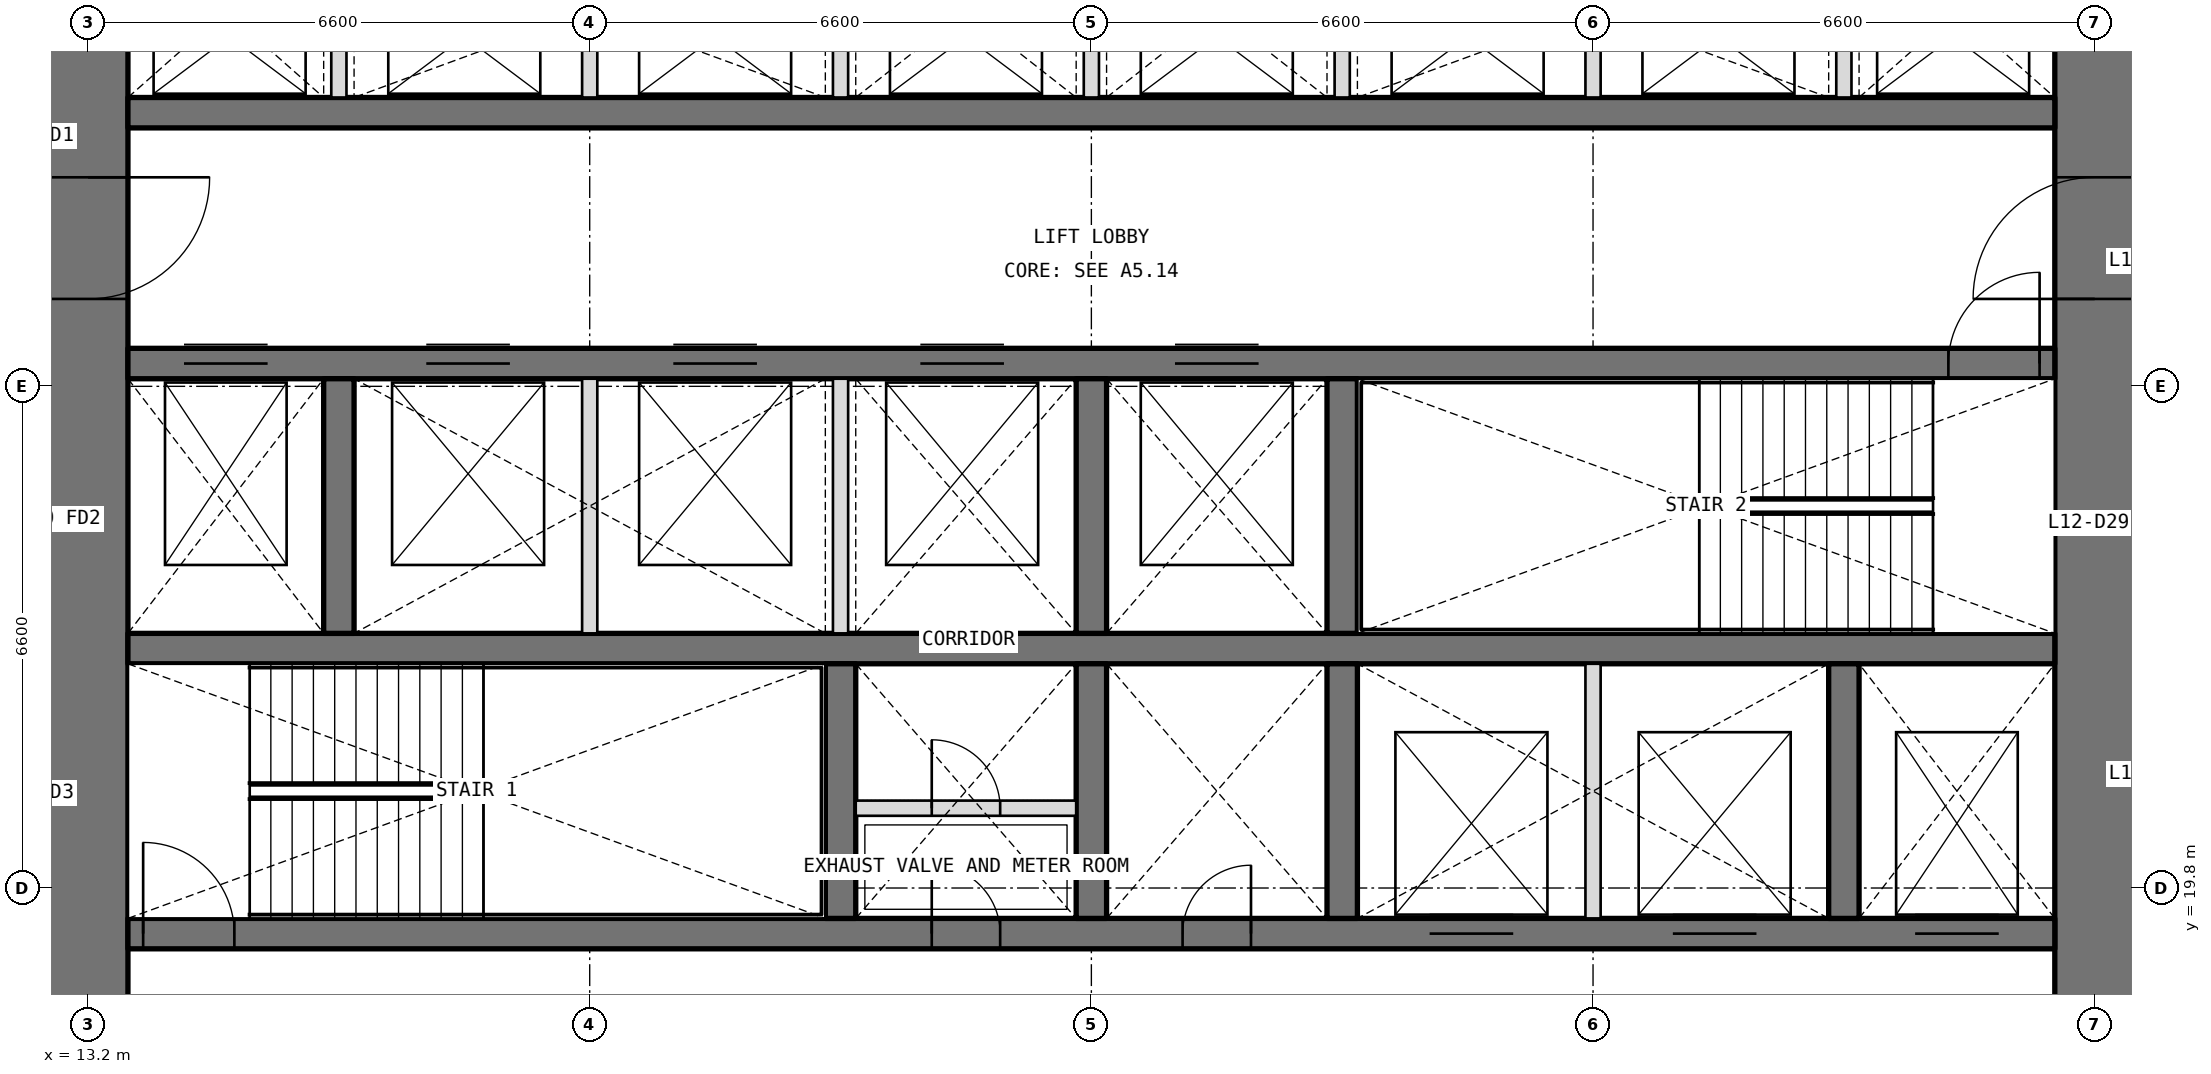
"""IFC4 building model, lengths in metres.
Left out: names, types, materials, properties, quantities, classifications, styles, units other than length and angle.
Written with IfcOpenShell. Run it as: python <this file> out.ifc"""

import sys

from ifc_helpers import new_model, si_unit, direction, frame, frame_2d, origin, place, context, subcontext, project, spatial, rectangle, extrude, element, fill, save


model = new_model("IFC4")
c1 = context("Model", 3, precision=1e-05, world=origin(), true_north=direction((0.0, 1.0)))
c2 = subcontext(c1, "Body", "Model", "MODEL_VIEW")
j1 = project(units=[si_unit("LENGTHUNIT", "METRE"), si_unit("PLANEANGLEUNIT", "RADIAN")], contexts=[c1])
p1 = place(None, origin())
s1 = spatial("IfcSite", under=j1, at=p1, CompositionType="ELEMENT")
p2 = place(p1, origin())
s2 = spatial("IfcBuilding", under=s1, at=p2, CompositionType="ELEMENT")
p3 = place(p2, frame((0.0, 0.0, 54.9)))
s3 = spatial("IfcBuildingStorey", under=s2, at=p3, CompositionType="ELEMENT", Elevation=54.9)
p4 = place(p3, frame((39.6, 13.725, 0.0), z_axis=(0.0, 0.0, 1.0), x_axis=(0.0, 1.0, 0.0)))
e1 = element("IfcWall", 1, at=p4, inside=s3, PredefinedType="SHEAR", context=c2, shape_type="SweptSolid", body=[
    extrude(rectangle(XDim=18.75, YDim=1.05, at=frame_2d((9.375, 0.0))), origin(), (0.0, 0.0, 1.0), 4.2),
])
p5 = place(p4, frame((3.025, 0.0, 0.0)))
e2 = element("IfcOpeningElement", 2, at=p5, cuts=e1, PredefinedType="OPENING", context=c2, shape_type="SweptSolid", body=[
    extrude(rectangle(XDim=1.6, YDim=2.1, at=frame_2d((0.8, 1.05))), frame((0.0, 0.535, 0.0), z_axis=(0.0, -1.0, 0.0), x_axis=(1.0, 0.0, 0.0)), (0.0, 0.0, 1.0), 1.07),
])
p6 = place(p4, frame((13.825, 0.0, 0.0)))
e3 = element("IfcOpeningElement", 3, at=p6, cuts=e1, PredefinedType="OPENING", context=c2, shape_type="SweptSolid", body=[
    extrude(rectangle(XDim=1.6, YDim=2.1, at=frame_2d((0.8, 1.05))), frame((0.0, 0.535, 0.0), z_axis=(0.0, -1.0, 0.0), x_axis=(1.0, 0.0, 0.0)), (0.0, 0.0, 1.0), 1.07),
])
p7 = place(p3, frame((13.2, 32.475, 0.0), z_axis=(0.0, 0.0, 1.0), x_axis=(0.0, -1.0, 0.0)))
e4 = element("IfcWall", 4, at=p7, inside=s3, PredefinedType="SHEAR", context=c2, shape_type="SweptSolid", body=[
    extrude(rectangle(XDim=18.75, YDim=1.05, at=frame_2d((9.375, 0.0))), origin(), (0.0, 0.0, 1.0), 4.2),
])
p8 = place(p7, frame((14.125, 0.0, 0.0)))
e5 = element("IfcOpeningElement", 5, at=p8, cuts=e4, PredefinedType="OPENING", context=c2, shape_type="SweptSolid", body=[
    extrude(rectangle(XDim=1.6, YDim=2.1, at=frame_2d((0.8, 1.05))), frame((0.0, 0.535, 0.0), z_axis=(0.0, -1.0, 0.0), x_axis=(1.0, 0.0, 0.0)), (0.0, 0.0, 1.0), 1.07),
])
p9 = place(p7, frame((3.325, 0.0, 0.0)))
e6 = element("IfcOpeningElement", 6, at=p9, cuts=e4, PredefinedType="OPENING", context=c2, shape_type="SweptSolid", body=[
    extrude(rectangle(XDim=1.6, YDim=2.1, at=frame_2d((0.8, 1.05))), frame((0.0, 0.535, 0.0), z_axis=(0.0, -1.0, 0.0), x_axis=(1.0, 0.0, 0.0)), (0.0, 0.0, 1.0), 1.07),
])
p10 = place(p3, frame((13.725, 19.2, 0.0), z_axis=(0.0, 0.0, 1.0), x_axis=(1.0, 0.0, 0.0)))
e7 = element("IfcWall", 7, at=p10, inside=s3, PredefinedType="SHEAR", context=c2, shape_type="SweptSolid", body=[
    extrude(rectangle(XDim=25.35, YDim=0.4, at=frame_2d((12.675, 0.0))), origin(), (0.0, 0.0, 1.0), 4.2),
])
p11 = place(p10, frame((10.575, 0.0, 0.0)))
e8 = element("IfcOpeningElement", 8, at=p11, cuts=e7, PredefinedType="OPENING", context=c2, shape_type="SweptSolid", body=[
    extrude(rectangle(XDim=0.9, YDim=2.1, at=frame_2d((0.45, 1.05))), frame((0.0, 0.21, 0.0), z_axis=(0.0, -1.0, 0.0), x_axis=(1.0, 0.0, 0.0)), (0.0, 0.0, 1.0), 0.42),
])
p12 = place(p10, frame((13.875, 0.0, 0.0)))
e9 = element("IfcOpeningElement", 9, at=p12, cuts=e7, PredefinedType="OPENING", context=c2, shape_type="SweptSolid", body=[
    extrude(rectangle(XDim=0.9, YDim=2.1, at=frame_2d((0.45, 1.05))), frame((0.0, 0.21, 0.0), z_axis=(0.0, -1.0, 0.0), x_axis=(1.0, 0.0, 0.0)), (0.0, 0.0, 1.0), 0.42),
])
p13 = place(p10, frame((0.2, 0.0, 0.0)))
e10 = element("IfcOpeningElement", 10, at=p13, cuts=e7, PredefinedType="OPENING", context=c2, shape_type="SweptSolid", body=[
    extrude(rectangle(XDim=1.2, YDim=2.1, at=frame_2d((0.6, 1.05))), frame((0.0, 0.21, 0.0), z_axis=(0.0, -1.0, 0.0), x_axis=(1.0, 0.0, 0.0)), (0.0, 0.0, 1.0), 0.42),
])
p14 = place(p10, frame((23.512, 0.0, 0.0)))
e11 = element("IfcOpeningElement", 11, at=p14, cuts=e7, PredefinedType="OPENING", context=c2, shape_type="SweptSolid", body=[
    extrude(rectangle(XDim=1.1, YDim=2.1, at=frame_2d((0.55, 1.05))), frame((0.0, 0.21, 0.0), z_axis=(0.0, -1.0, 0.0), x_axis=(1.0, 0.0, 0.0)), (0.0, 0.0, 1.0), 0.42),
])
p15 = place(p10, frame((17.125, 0.0, 0.0)))
e12 = element("IfcOpeningElement", 12, at=p15, cuts=e7, PredefinedType="OPENING", context=c2, shape_type="SweptSolid", body=[
    extrude(rectangle(XDim=1.1, YDim=2.1, at=frame_2d((0.55, 1.05))), frame((0.0, 0.21, 0.0), z_axis=(0.0, -1.0, 0.0), x_axis=(1.0, 0.0, 0.0)), (0.0, 0.0, 1.0), 0.42),
])
p16 = place(p10, frame((20.325, 0.0, 0.0)))
e13 = element("IfcOpeningElement", 13, at=p16, cuts=e7, PredefinedType="OPENING", context=c2, shape_type="SweptSolid", body=[
    extrude(rectangle(XDim=1.1, YDim=2.1, at=frame_2d((0.55, 1.05))), frame((0.0, 0.21, 0.0), z_axis=(0.0, -1.0, 0.0), x_axis=(1.0, 0.0, 0.0)), (0.0, 0.0, 1.0), 0.42),
])
p17 = place(p3, frame((13.725, 22.95, 0.0), z_axis=(0.0, 0.0, 1.0), x_axis=(1.0, 0.0, 0.0)))
e14 = element("IfcWall", 14, at=p17, inside=s3, PredefinedType="SHEAR", context=c2, shape_type="SweptSolid", body=[
    extrude(rectangle(XDim=25.35, YDim=0.4, at=frame_2d((12.675, 0.0))), origin(), (0.0, 0.0, 1.0), 4.2),
])
p18 = place(p3, frame((13.725, 26.7, 0.0), z_axis=(0.0, 0.0, 1.0), x_axis=(1.0, 0.0, 0.0)))
e15 = element("IfcWall", 15, at=p18, inside=s3, PredefinedType="SHEAR", context=c2, shape_type="SweptSolid", body=[
    extrude(rectangle(XDim=25.35, YDim=0.4, at=frame_2d((12.675, 0.0))), origin(), (0.0, 0.0, 1.0), 4.2),
])
p19 = place(p18, frame((23.95, 0.0, 0.0)))
e16 = element("IfcOpeningElement", 16, at=p19, cuts=e15, PredefinedType="OPENING", context=c2, shape_type="SweptSolid", body=[
    extrude(rectangle(XDim=1.2, YDim=2.1, at=frame_2d((0.6, 1.05))), frame((0.0, 0.21, 0.0), z_axis=(0.0, -1.0, 0.0), x_axis=(1.0, 0.0, 0.0)), (0.0, 0.0, 1.0), 0.42),
])
p20 = place(p18, frame((0.738, 0.0, 0.0)))
e17 = element("IfcOpeningElement", 17, at=p20, cuts=e15, PredefinedType="OPENING", context=c2, shape_type="SweptSolid", body=[
    extrude(rectangle(XDim=1.1, YDim=2.1, at=frame_2d((0.55, 1.05))), frame((0.0, 0.21, 0.0), z_axis=(0.0, -1.0, 0.0), x_axis=(1.0, 0.0, 0.0)), (0.0, 0.0, 1.0), 0.42),
])
p21 = place(p18, frame((3.925, 0.0, 0.0)))
e18 = element("IfcOpeningElement", 18, at=p21, cuts=e15, PredefinedType="OPENING", context=c2, shape_type="SweptSolid", body=[
    extrude(rectangle(XDim=1.1, YDim=2.1, at=frame_2d((0.55, 1.05))), frame((0.0, 0.21, 0.0), z_axis=(0.0, -1.0, 0.0), x_axis=(1.0, 0.0, 0.0)), (0.0, 0.0, 1.0), 0.42),
])
p22 = place(p18, frame((7.175, 0.0, 0.0)))
e19 = element("IfcOpeningElement", 19, at=p22, cuts=e15, PredefinedType="OPENING", context=c2, shape_type="SweptSolid", body=[
    extrude(rectangle(XDim=1.1, YDim=2.1, at=frame_2d((0.55, 1.05))), frame((0.0, 0.21, 0.0), z_axis=(0.0, -1.0, 0.0), x_axis=(1.0, 0.0, 0.0)), (0.0, 0.0, 1.0), 0.42),
])
p23 = place(p18, frame((10.425, 0.0, 0.0)))
e20 = element("IfcOpeningElement", 20, at=p23, cuts=e15, PredefinedType="OPENING", context=c2, shape_type="SweptSolid", body=[
    extrude(rectangle(XDim=1.1, YDim=2.1, at=frame_2d((0.55, 1.05))), frame((0.0, 0.21, 0.0), z_axis=(0.0, -1.0, 0.0), x_axis=(1.0, 0.0, 0.0)), (0.0, 0.0, 1.0), 0.42),
])
p24 = place(p18, frame((13.775, 0.0, 0.0)))
e21 = element("IfcOpeningElement", 21, at=p24, cuts=e15, PredefinedType="OPENING", context=c2, shape_type="SweptSolid", body=[
    extrude(rectangle(XDim=1.1, YDim=2.1, at=frame_2d((0.55, 1.05))), frame((0.0, 0.21, 0.0), z_axis=(0.0, -1.0, 0.0), x_axis=(1.0, 0.0, 0.0)), (0.0, 0.0, 1.0), 0.42),
])
p25 = place(p3, frame((13.725, 30.0, 0.0), z_axis=(0.0, 0.0, 1.0), x_axis=(1.0, 0.0, 0.0)))
e22 = element("IfcWall", 22, at=p25, inside=s3, PredefinedType="SHEAR", context=c2, shape_type="SweptSolid", body=[
    extrude(rectangle(XDim=25.35, YDim=0.4, at=frame_2d((12.675, 0.0))), origin(), (0.0, 0.0, 1.0), 4.2),
])
for number, where, z_axis, x_axis in (
    (23, (23.1, 19.4, 0.0), (0.0, 0.0, 1.0), (0.0, 1.0, 0.0)),
    (24, (26.4, 19.4, 0.0), (0.0, 0.0, 1.0), (0.0, 1.0, 0.0)),
    (25, (29.7, 19.4, 0.0), (0.0, 0.0, 1.0), (0.0, 1.0, 0.0)),
    (26, (36.3, 19.4, 0.0), (0.0, 0.0, 1.0), (0.0, 1.0, 0.0)),
    (27, (16.5, 23.15, 0.0), (0.0, 0.0, 1.0), (0.0, 1.0, 0.0)),
    (28, (26.4, 23.15, 0.0), (0.0, 0.0, 1.0), (0.0, 1.0, 0.0)),
    (29, (29.7, 23.15, 0.0), (0.0, 0.0, 1.0), (0.0, 1.0, 0.0)),
):
    element("IfcWall", number, at=place(p3, frame(where, z_axis=z_axis, x_axis=x_axis)), inside=s3, PredefinedType="SHEAR", context=c2, shape_type="SweptSolid", body=[
        extrude(rectangle(XDim=3.35, YDim=0.4, at=frame_2d((1.675, 0.0))), origin(), (0.0, 0.0, 1.0), 4.2),
    ])
for number, where, z_axis, x_axis in (
    (30, (16.5, 30.2, 0.0), (0.0, 0.0, 1.0), (0.0, 1.0, 0.0)),
    (31, (19.8, 30.2, 0.0), (0.0, 0.0, 1.0), (0.0, 1.0, 0.0)),
    (32, (23.1, 30.2, 0.0), (0.0, 0.0, 1.0), (0.0, 1.0, 0.0)),
    (33, (26.4, 30.2, 0.0), (0.0, 0.0, 1.0), (0.0, 1.0, 0.0)),
    (34, (29.7, 30.2, 0.0), (0.0, 0.0, 1.0), (0.0, 1.0, 0.0)),
    (35, (33.0, 30.2, 0.0), (0.0, 0.0, 1.0), (0.0, 1.0, 0.0)),
    (36, (36.3, 30.2, 0.0), (0.0, 0.0, 1.0), (0.0, 1.0, 0.0)),
):
    element("IfcWall", number, at=place(p3, frame(where, z_axis=z_axis, x_axis=x_axis)), inside=s3, PredefinedType="PARTITIONING", context=c2, shape_type="SweptSolid", body=[
        extrude(rectangle(XDim=2.275, YDim=0.2, at=frame_2d((1.138, 0.0))), origin(), (0.0, 0.0, 1.0), 4.2),
    ])
for number, where, z_axis, x_axis in (
    (37, (33.0, 19.4, 0.0), (0.0, 0.0, 1.0), (0.0, 1.0, 0.0)),
    (38, (19.8, 23.15, 0.0), (0.0, 0.0, 1.0), (0.0, 1.0, 0.0)),
    (39, (23.1, 23.15, 0.0), (0.0, 0.0, 1.0), (0.0, 1.0, 0.0)),
):
    element("IfcWall", number, at=place(p3, frame(where, z_axis=z_axis, x_axis=x_axis)), inside=s3, PredefinedType="PARTITIONING", context=c2, shape_type="SweptSolid", body=[
        extrude(rectangle(XDim=3.35, YDim=0.2, at=frame_2d((1.675, 0.0))), origin(), (0.0, 0.0, 1.0), 4.2),
    ])
p26 = place(p3, frame((23.3, 20.85, 0.0), z_axis=(0.0, 0.0, 1.0), x_axis=(1.0, 0.0, 0.0)))
e40 = element("IfcWall", 40, at=p26, inside=s3, PredefinedType="PARTITIONING", context=c2, shape_type="SweptSolid", body=[
    extrude(rectangle(XDim=2.9, YDim=0.2, at=frame_2d((1.45, 0.0))), origin(), (0.0, 0.0, 1.0), 3.9),
])
p27 = place(p26, frame((1.0, 0.0, 0.0)))
e41 = element("IfcOpeningElement", 41, at=p27, cuts=e40, PredefinedType="OPENING", context=c2, shape_type="SweptSolid", body=[
    extrude(rectangle(XDim=0.9, YDim=2.1, at=frame_2d((0.45, 1.05))), frame((0.0, 0.11, 0.0), z_axis=(0.0, -1.0, 0.0), x_axis=(1.0, 0.0, 0.0)), (0.0, 0.0, 1.0), 0.22),
])
p28 = place(p11, origin())
e42 = element("IfcDoor", 42, at=p28, inside=s3, OperationType="SINGLE_SWING_LEFT", PredefinedType="DOOR", context=c2, shape_type="SweptSolid", body=[
    extrude(rectangle(XDim=0.9, YDim=2.1, at=frame_2d((0.45, 1.05))), frame((0.0, 0.025, 0.0), z_axis=(0.0, -1.0, 0.0), x_axis=(1.0, 0.0, 0.0)), (0.0, 0.0, 1.0), 0.05),
])
fill(e8, e42)
p29 = place(p27, origin())
e43 = element("IfcDoor", 43, at=p29, inside=s3, OperationType="SINGLE_SWING_LEFT", PredefinedType="DOOR", context=c2, shape_type="SweptSolid", body=[
    extrude(rectangle(XDim=0.9, YDim=2.1, at=frame_2d((0.45, 1.05))), frame((0.0, 0.025, 0.0), z_axis=(0.0, -1.0, 0.0), x_axis=(1.0, 0.0, 0.0)), (0.0, 0.0, 1.0), 0.05),
])
fill(e41, e43)
p30 = place(p12, origin())
e44 = element("IfcDoor", 44, at=p30, inside=s3, OperationType="SINGLE_SWING_RIGHT", PredefinedType="DOOR", context=c2, shape_type="SweptSolid", body=[
    extrude(rectangle(XDim=0.9, YDim=2.1, at=frame_2d((0.45, 1.05))), frame((0.0, 0.025, 0.0), z_axis=(0.0, -1.0, 0.0), x_axis=(1.0, 0.0, 0.0)), (0.0, 0.0, 1.0), 0.05),
])
fill(e9, e44)
p31 = place(p13, origin())
e45 = element("IfcDoor", 45, at=p31, inside=s3, OperationType="SINGLE_SWING_LEFT", PredefinedType="DOOR", context=c2, shape_type="SweptSolid", body=[
    extrude(rectangle(XDim=1.2, YDim=2.1, at=frame_2d((0.6, 1.05))), frame((0.0, 0.025, 0.0), z_axis=(0.0, -1.0, 0.0), x_axis=(1.0, 0.0, 0.0)), (0.0, 0.0, 1.0), 0.05),
])
fill(e10, e45)
p32 = place(p19, origin())
e46 = element("IfcDoor", 46, at=p32, inside=s3, OperationType="SINGLE_SWING_RIGHT", PredefinedType="DOOR", context=c2, shape_type="SweptSolid", body=[
    extrude(rectangle(XDim=1.2, YDim=2.1, at=frame_2d((0.6, 1.05))), frame((0.0, 0.025, 0.0), z_axis=(0.0, -1.0, 0.0), x_axis=(1.0, 0.0, 0.0)), (0.0, 0.0, 1.0), 0.05),
])
fill(e16, e46)
p33 = place(p9, origin())
e47 = element("IfcDoor", 47, at=p33, inside=s3, OperationType="DOUBLE_DOOR_DOUBLE_SWING", PredefinedType="DOOR", context=c2, shape_type="SweptSolid", body=[
    extrude(rectangle(XDim=1.6, YDim=2.1, at=frame_2d((0.8, 1.05))), frame((0.0, 0.025, 0.0), z_axis=(0.0, -1.0, 0.0), x_axis=(1.0, 0.0, 0.0)), (0.0, 0.0, 1.0), 0.05),
])
fill(e6, e47)
p34 = place(p6, origin())
e48 = element("IfcDoor", 48, at=p34, inside=s3, OperationType="DOUBLE_DOOR_DOUBLE_SWING", PredefinedType="DOOR", context=c2, shape_type="SweptSolid", body=[
    extrude(rectangle(XDim=1.6, YDim=2.1, at=frame_2d((0.8, 1.05))), frame((0.0, 0.025, 0.0), z_axis=(0.0, -1.0, 0.0), x_axis=(1.0, 0.0, 0.0)), (0.0, 0.0, 1.0), 0.05),
])
fill(e3, e48)
p35 = place(p20, origin())
e49 = element("IfcDoor", 49, at=p35, inside=s3, OperationType="DOUBLE_DOOR_SLIDING", PredefinedType="DOOR", context=c2, shape_type="SweptSolid", body=[
    extrude(rectangle(XDim=1.1, YDim=2.1, at=frame_2d((0.55, 1.05))), frame((0.0, 0.025, 0.0), z_axis=(0.0, -1.0, 0.0), x_axis=(1.0, 0.0, 0.0)), (0.0, 0.0, 1.0), 0.05),
])
fill(e17, e49)
p36 = place(p14, origin())
e50 = element("IfcDoor", 50, at=p36, inside=s3, OperationType="DOUBLE_DOOR_SLIDING", PredefinedType="DOOR", context=c2, shape_type="SweptSolid", body=[
    extrude(rectangle(XDim=1.1, YDim=2.1, at=frame_2d((0.55, 1.05))), frame((0.0, 0.025, 0.0), z_axis=(0.0, -1.0, 0.0), x_axis=(1.0, 0.0, 0.0)), (0.0, 0.0, 1.0), 0.05),
])
fill(e11, e50)
p37 = place(p15, origin())
e51 = element("IfcDoor", 51, at=p37, inside=s3, OperationType="DOUBLE_DOOR_SLIDING", PredefinedType="DOOR", context=c2, shape_type="SweptSolid", body=[
    extrude(rectangle(XDim=1.1, YDim=2.1, at=frame_2d((0.55, 1.05))), frame((0.0, 0.025, 0.0), z_axis=(0.0, -1.0, 0.0), x_axis=(1.0, 0.0, 0.0)), (0.0, 0.0, 1.0), 0.05),
])
fill(e12, e51)
p38 = place(p16, origin())
e52 = element("IfcDoor", 52, at=p38, inside=s3, OperationType="DOUBLE_DOOR_SLIDING", PredefinedType="DOOR", context=c2, shape_type="SweptSolid", body=[
    extrude(rectangle(XDim=1.1, YDim=2.1, at=frame_2d((0.55, 1.05))), frame((0.0, 0.025, 0.0), z_axis=(0.0, -1.0, 0.0), x_axis=(1.0, 0.0, 0.0)), (0.0, 0.0, 1.0), 0.05),
])
fill(e13, e52)
p39 = place(p21, origin())
e53 = element("IfcDoor", 53, at=p39, inside=s3, OperationType="DOUBLE_DOOR_SLIDING", PredefinedType="DOOR", context=c2, shape_type="SweptSolid", body=[
    extrude(rectangle(XDim=1.1, YDim=2.1, at=frame_2d((0.55, 1.05))), frame((0.0, 0.025, 0.0), z_axis=(0.0, -1.0, 0.0), x_axis=(1.0, 0.0, 0.0)), (0.0, 0.0, 1.0), 0.05),
])
fill(e18, e53)
p40 = place(p22, origin())
e54 = element("IfcDoor", 54, at=p40, inside=s3, OperationType="DOUBLE_DOOR_SLIDING", PredefinedType="DOOR", context=c2, shape_type="SweptSolid", body=[
    extrude(rectangle(XDim=1.1, YDim=2.1, at=frame_2d((0.55, 1.05))), frame((0.0, 0.025, 0.0), z_axis=(0.0, -1.0, 0.0), x_axis=(1.0, 0.0, 0.0)), (0.0, 0.0, 1.0), 0.05),
])
fill(e19, e54)
p41 = place(p23, origin())
e55 = element("IfcDoor", 55, at=p41, inside=s3, OperationType="DOUBLE_DOOR_SLIDING", PredefinedType="DOOR", context=c2, shape_type="SweptSolid", body=[
    extrude(rectangle(XDim=1.1, YDim=2.1, at=frame_2d((0.55, 1.05))), frame((0.0, 0.025, 0.0), z_axis=(0.0, -1.0, 0.0), x_axis=(1.0, 0.0, 0.0)), (0.0, 0.0, 1.0), 0.05),
])
fill(e20, e55)
p42 = place(p24, origin())
e56 = element("IfcDoor", 56, at=p42, inside=s3, OperationType="DOUBLE_DOOR_SLIDING", PredefinedType="DOOR", context=c2, shape_type="SweptSolid", body=[
    extrude(rectangle(XDim=1.1, YDim=2.1, at=frame_2d((0.55, 1.05))), frame((0.0, 0.025, 0.0), z_axis=(0.0, -1.0, 0.0), x_axis=(1.0, 0.0, 0.0)), (0.0, 0.0, 1.0), 0.05),
])
fill(e21, e56)
save(model, sys.argv[1])
